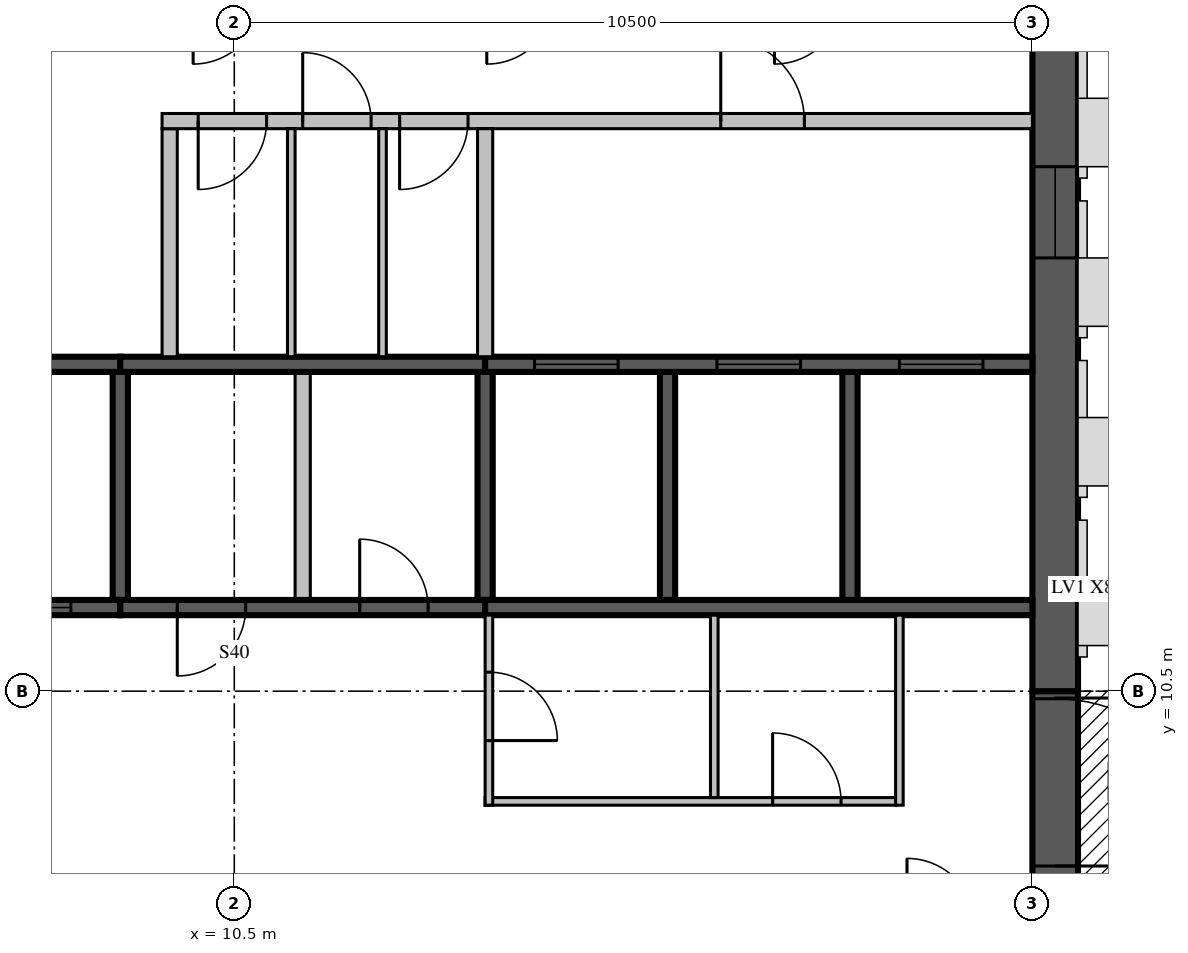
"""IFC4 building model, lengths in metres.
Left out: names, types, materials, properties, quantities, classifications, styles, units other than length and angle.
Written with IfcOpenShell. Run it as: python <this file> out.ifc"""

import sys

from ifc_helpers import new_model, si_unit, direction, frame, frame_2d, origin, place, context, subcontext, project, spatial, rectangle, extrude, source, transform, mapped, element, fill, save


model = new_model("IFC4")
c1 = context("Model", 3, precision=1e-05, world=origin(), true_north=direction((0.0, 1.0)))
c2 = subcontext(c1, "Body", "Model", "MODEL_VIEW")
j1 = project(units=[si_unit("LENGTHUNIT", "METRE"), si_unit("PLANEANGLEUNIT", "RADIAN")], contexts=[c1])
p1 = place(None, origin())
s1 = spatial("IfcSite", under=j1, at=p1, CompositionType="ELEMENT")
p2 = place(p1, origin())
s2 = spatial("IfcBuilding", under=s1, at=p2, CompositionType="ELEMENT")
p3 = place(p2, frame((0.0, 0.0, 291.5)))
s3 = spatial("IfcBuildingStorey", under=s2, at=p3, CompositionType="ELEMENT", Elevation=291.5)
m1 = source(origin(), c2, "Body", "SweptSolid", [
    extrude(rectangle(XDim=6.3, YDim=0.6, at=frame_2d((3.15, 0.0))), origin(), (0.0, 0.0, 1.0), 3.5),
])
p4 = place(p3, frame((21.3, 4.2, 0.0), z_axis=(0.0, 0.0, 1.0), x_axis=(0.0, 1.0, 0.0)))
e1 = element("IfcWall", 1, at=p4, inside=s3, PredefinedType="SHEAR", context=c2, shape_type="MappedRepresentation", body=[
    mapped(m1, transform((0.0, 0.0, 0.0), scale=1.0)),
])
m2 = source(origin(), c2, "Body", "SweptSolid", [
    extrude(rectangle(XDim=2.2, YDim=2.1, at=frame_2d((1.1, 1.05))), frame((0.0, 0.31, 0.0), z_axis=(0.0, -1.0, 0.0), x_axis=(1.0, 0.0, 0.0)), (0.0, 0.0, 1.0), 0.62),
])
p5 = place(p4, frame((4.0, 0.0, 0.0)))
e2 = element("IfcOpeningElement", 2, at=p5, cuts=e1, PredefinedType="OPENING", context=c2, shape_type="MappedRepresentation", body=[
    mapped(m2, transform((0.0, 0.0, 0.0), scale=1.0)),
])
m3 = source(origin(), c2, "Body", "SweptSolid", [
    extrude(rectangle(XDim=10.5, YDim=0.6, at=frame_2d((5.25, 0.0))), origin(), (0.0, 0.0, 1.0), 3.5),
])
p6 = place(p3, frame((21.3, 10.5, 0.0), z_axis=(0.0, 0.0, 1.0), x_axis=(0.0, 1.0, 0.0)))
e3 = element("IfcWall", 3, at=p6, inside=s3, PredefinedType="SHEAR", context=c2, shape_type="MappedRepresentation", body=[
    mapped(m3, transform((0.0, 0.0, 0.0), scale=1.0)),
])
m4 = source(origin(), c2, "Body", "SweptSolid", [
    extrude(rectangle(XDim=1.2, YDim=2.4, at=frame_2d((0.6, 1.2))), frame((0.0, 0.31, 0.0), z_axis=(0.0, -1.0, 0.0), x_axis=(1.0, 0.0, 0.0)), (0.0, 0.0, 1.0), 0.62),
])
p7 = place(p6, frame((5.7, 0.0, 0.6)))
e4 = element("IfcOpeningElement", 4, at=p7, cuts=e3, PredefinedType="OPENING", context=c2, shape_type="MappedRepresentation", body=[
    mapped(m4, transform((0.0, 0.0, 0.0), scale=1.0)),
])
m5 = source(origin(), c2, "Body", "SweptSolid", [
    extrude(rectangle(XDim=3.0, YDim=0.2, at=frame_2d((1.5, 0.0))), origin(), (0.0, 0.0, 1.0), 3.1),
])
for number, where, z_axis, x_axis in (
    (5, (9.0, 11.7, 0.0), (0.0, 0.0, 1.0), (0.0, 1.0, 0.0)),
    (6, (13.8, 11.7, 0.0), (0.0, 0.0, 1.0), (0.0, 1.0, 0.0)),
):
    element("IfcWall", number, at=place(p3, frame(where, z_axis=z_axis, x_axis=x_axis)), inside=s3, PredefinedType="SOLIDWALL", context=c2, shape_type="MappedRepresentation", body=[
        mapped(m5, transform((0.0, 0.0, 0.0), scale=1.0)),
    ])
m6 = source(origin(), c2, "Body", "SweptSolid", [
    extrude(rectangle(XDim=3.0, YDim=0.2, at=frame_2d((1.5, 0.0))), origin(), (0.0, 0.0, 1.0), 3.5),
])
for number, where, z_axis, x_axis in (
    (7, (16.2, 11.7, 0.0), (0.0, 0.0, 1.0), (0.0, 1.0, 0.0)),
    (8, (18.6, 11.7, 0.0), (0.0, 0.0, 1.0), (0.0, 1.0, 0.0)),
):
    element("IfcWall", number, at=place(p3, frame(where, z_axis=z_axis, x_axis=x_axis)), inside=s3, PredefinedType="SOLIDWALL", context=c2, shape_type="MappedRepresentation", body=[
        mapped(m6, transform((0.0, 0.0, 0.0), scale=1.0)),
    ])
m7 = source(origin(), c2, "Body", "SweptSolid", [
    extrude(rectangle(XDim=3.0, YDim=0.2, at=frame_2d((1.5, 0.0))), origin(), (0.0, 0.0, 1.0), 3.1),
])
p8 = place(p3, frame((11.4, 11.7, 0.0), z_axis=(0.0, 0.0, 1.0), x_axis=(0.0, 1.0, 0.0)))
e9 = element("IfcWall", 9, at=p8, inside=s3, PredefinedType="PARTITIONING", context=c2, shape_type="MappedRepresentation", body=[
    mapped(m7, transform((0.0, 0.0, 0.0), scale=1.0)),
])
m8 = source(origin(), c2, "Body", "SweptSolid", [
    extrude(rectangle(XDim=4.8, YDim=0.2, at=frame_2d((2.4, 0.0))), origin(), (0.0, 0.0, 1.0), 3.5),
])
p9 = place(p3, frame((4.2, 11.6, 0.0), z_axis=(0.0, 0.0, 1.0), x_axis=(1.0, 0.0, 0.0)))
e10 = element("IfcWall", 10, at=p9, inside=s3, PredefinedType="SOLIDWALL", context=c2, shape_type="MappedRepresentation", body=[
    mapped(m8, transform((0.0, 0.0, 0.0), scale=1.0)),
])
m9 = source(origin(), c2, "Body", "SweptSolid", [
    extrude(rectangle(XDim=1.1, YDim=2.1, at=frame_2d((0.55, 1.05))), frame((0.0, 0.11, 0.0), z_axis=(0.0, -1.0, 0.0), x_axis=(1.0, 0.0, 0.0)), (0.0, 0.0, 1.0), 0.22),
])
p10 = place(p9, frame((0.65, 0.0, 0.0)))
e11 = element("IfcOpeningElement", 11, at=p10, cuts=e10, PredefinedType="OPENING", context=c2, shape_type="MappedRepresentation", body=[
    mapped(m9, transform((0.0, 0.0, 0.0), scale=1.0)),
])
p11 = place(p9, frame((3.05, 0.0, 0.0)))
e12 = element("IfcOpeningElement", 12, at=p11, cuts=e10, PredefinedType="OPENING", context=c2, shape_type="MappedRepresentation", body=[
    mapped(m9, transform((0.0, 0.0, 0.0), scale=1.0)),
])
m10 = source(origin(), c2, "Body", "SweptSolid", [
    extrude(rectangle(XDim=4.8, YDim=0.2, at=frame_2d((2.4, 0.0))), origin(), (0.0, 0.0, 1.0), 3.1),
])
p12 = place(p3, frame((9.0, 11.6, 0.0), z_axis=(0.0, 0.0, 1.0), x_axis=(1.0, 0.0, 0.0)))
e13 = element("IfcWall", 13, at=p12, inside=s3, PredefinedType="SOLIDWALL", context=c2, shape_type="MappedRepresentation", body=[
    mapped(m10, transform((0.0, 0.0, 0.0), scale=1.0)),
])
m11 = source(origin(), c2, "Body", "SweptSolid", [
    extrude(rectangle(XDim=0.9, YDim=2.1, at=frame_2d((0.45, 1.05))), frame((0.0, 0.11, 0.0), z_axis=(0.0, -1.0, 0.0), x_axis=(1.0, 0.0, 0.0)), (0.0, 0.0, 1.0), 0.22),
])
p13 = place(p12, frame((0.75, 0.0, 0.0)))
e14 = element("IfcOpeningElement", 14, at=p13, cuts=e13, PredefinedType="OPENING", context=c2, shape_type="MappedRepresentation", body=[
    mapped(m11, transform((0.0, 0.0, 0.0), scale=1.0)),
])
p14 = place(p12, frame((3.15, 0.0, 0.0)))
e15 = element("IfcOpeningElement", 15, at=p14, cuts=e13, PredefinedType="OPENING", context=c2, shape_type="MappedRepresentation", body=[
    mapped(m11, transform((0.0, 0.0, 0.0), scale=1.0)),
])
m12 = source(origin(), c2, "Body", "SweptSolid", [
    extrude(rectangle(XDim=7.2, YDim=0.2, at=frame_2d((3.6, 0.0))), origin(), (0.0, 0.0, 1.0), 3.5),
])
p15 = place(p3, frame((13.8, 11.6, 0.0), z_axis=(0.0, 0.0, 1.0), x_axis=(1.0, 0.0, 0.0)))
e16 = element("IfcWall", 16, at=p15, inside=s3, PredefinedType="SOLIDWALL", context=c2, shape_type="MappedRepresentation", body=[
    mapped(m12, transform((0.0, 0.0, 0.0), scale=1.0)),
])
p16 = place(p3, frame((4.2, 14.8, 0.0), z_axis=(0.0, 0.0, 1.0), x_axis=(1.0, 0.0, 0.0)))
e17 = element("IfcWall", 17, at=p16, inside=s3, PredefinedType="SOLIDWALL", context=c2, shape_type="MappedRepresentation", body=[
    mapped(m8, transform((0.0, 0.0, 0.0), scale=1.0)),
])
p17 = place(p3, frame((9.0, 14.8, 0.0), z_axis=(0.0, 0.0, 1.0), x_axis=(1.0, 0.0, 0.0)))
e18 = element("IfcWall", 18, at=p17, inside=s3, PredefinedType="SOLIDWALL", context=c2, shape_type="MappedRepresentation", body=[
    mapped(m10, transform((0.0, 0.0, 0.0), scale=1.0)),
])
p18 = place(p3, frame((13.8, 14.8, 0.0), z_axis=(0.0, 0.0, 1.0), x_axis=(1.0, 0.0, 0.0)))
e19 = element("IfcWall", 19, at=p18, inside=s3, PredefinedType="SOLIDWALL", context=c2, shape_type="MappedRepresentation", body=[
    mapped(m12, transform((0.0, 0.0, 0.0), scale=1.0)),
])
p19 = place(p18, frame((0.65, 0.0, 0.0)))
e20 = element("IfcOpeningElement", 20, at=p19, cuts=e19, PredefinedType="OPENING", context=c2, shape_type="MappedRepresentation", body=[
    mapped(m9, transform((0.0, 0.0, 0.0), scale=1.0)),
])
p20 = place(p18, frame((3.05, 0.0, 0.0)))
e21 = element("IfcOpeningElement", 21, at=p20, cuts=e19, PredefinedType="OPENING", context=c2, shape_type="MappedRepresentation", body=[
    mapped(m9, transform((0.0, 0.0, 0.0), scale=1.0)),
])
p21 = place(p18, frame((5.45, 0.0, 0.0)))
e22 = element("IfcOpeningElement", 22, at=p21, cuts=e19, PredefinedType="OPENING", context=c2, shape_type="MappedRepresentation", body=[
    mapped(m9, transform((0.0, 0.0, 0.0), scale=1.0)),
])
p22 = place(p3, frame((9.65, 14.9, 0.0), z_axis=(0.0, 0.0, 1.0), x_axis=(0.0, 1.0, 0.0)))
e23 = element("IfcWall", 23, at=p22, inside=s3, PredefinedType="PARTITIONING", context=c2, shape_type="MappedRepresentation", body=[
    mapped(m7, transform((0.0, 0.0, 0.0), scale=1.0)),
])
m13 = source(origin(), c2, "Body", "SweptSolid", [
    extrude(rectangle(XDim=11.45, YDim=0.2, at=frame_2d((5.725, 0.0))), origin(), (0.0, 0.0, 1.0), 3.1),
])
p23 = place(p3, frame((9.55, 18.0, 0.0), z_axis=(0.0, 0.0, 1.0), x_axis=(1.0, 0.0, 0.0)))
e24 = element("IfcWall", 24, at=p23, inside=s3, PredefinedType="PARTITIONING", context=c2, shape_type="MappedRepresentation", body=[
    mapped(m13, transform((0.0, 0.0, 0.0), scale=1.0)),
])
p24 = place(p23, frame((0.475, 0.0, 0.0)))
e25 = element("IfcOpeningElement", 25, at=p24, cuts=e24, PredefinedType="OPENING", context=c2, shape_type="MappedRepresentation", body=[
    mapped(m11, transform((0.0, 0.0, 0.0), scale=1.0)),
])
p25 = place(p23, frame((1.85, 0.0, 0.0)))
e26 = element("IfcOpeningElement", 26, at=p25, cuts=e24, PredefinedType="OPENING", context=c2, shape_type="MappedRepresentation", body=[
    mapped(m11, transform((0.0, 0.0, 0.0), scale=1.0)),
])
p26 = place(p23, frame((3.125, 0.0, 0.0)))
e27 = element("IfcOpeningElement", 27, at=p26, cuts=e24, PredefinedType="OPENING", context=c2, shape_type="MappedRepresentation", body=[
    mapped(m11, transform((0.0, 0.0, 0.0), scale=1.0)),
])
p27 = place(p23, frame((7.35, 0.0, 0.0)))
e28 = element("IfcOpeningElement", 28, at=p27, cuts=e24, PredefinedType="OPENING", context=c2, shape_type="MappedRepresentation", body=[
    mapped(m9, transform((0.0, 0.0, 0.0), scale=1.0)),
])
p28 = place(p3, frame((13.8, 9.05, 0.0), z_axis=(0.0, 0.0, 1.0), x_axis=(1.0, 0.0, 0.0)))
e29 = element("IfcWall", 29, at=p28, inside=s3, PredefinedType="PARTITIONING", context=c2, shape_type="SweptSolid", body=[
    extrude(rectangle(XDim=5.4, YDim=0.1, at=frame_2d((2.7, 0.0))), origin(), (0.0, 0.0, 1.0), 3.1),
])
m14 = source(origin(), c2, "Body", "SweptSolid", [
    extrude(rectangle(XDim=0.9, YDim=2.1, at=frame_2d((0.45, 1.05))), frame((0.0, 0.06, 0.0), z_axis=(0.0, -1.0, 0.0), x_axis=(1.0, 0.0, 0.0)), (0.0, 0.0, 1.0), 0.12),
])
p29 = place(p28, frame((3.783, 0.0, 0.0)))
e30 = element("IfcOpeningElement", 30, at=p29, cuts=e29, PredefinedType="OPENING", context=c2, shape_type="MappedRepresentation", body=[
    mapped(m14, transform((0.0, 0.0, 0.0), scale=1.0)),
])
p30 = place(p3, frame((13.85, 9.0, 0.0), z_axis=(0.0, 0.0, 1.0), x_axis=(0.0, 1.0, 0.0)))
e31 = element("IfcWall", 31, at=p30, inside=s3, PredefinedType="PARTITIONING", context=c2, shape_type="SweptSolid", body=[
    extrude(rectangle(XDim=2.5, YDim=0.1, at=frame_2d((1.25, 0.0))), origin(), (0.0, 0.0, 1.0), 3.1),
])
p31 = place(p30, frame((0.85, 0.0, 0.0)))
e32 = element("IfcOpeningElement", 32, at=p31, cuts=e31, PredefinedType="OPENING", context=c2, shape_type="MappedRepresentation", body=[
    mapped(m14, transform((0.0, 0.0, 0.0), scale=1.0)),
])
p32 = place(p3, frame((16.815, 9.1, 0.0), z_axis=(0.0, 0.0, 1.0), x_axis=(0.0, 1.0, 0.0)))
e33 = element("IfcWall", 33, at=p32, inside=s3, PredefinedType="PARTITIONING", context=c2, shape_type="SweptSolid", body=[
    extrude(rectangle(XDim=2.4, YDim=0.1, at=frame_2d((1.2, 0.0))), origin(), (0.0, 0.0, 1.0), 3.1),
])
m15 = source(origin(), c2, "Body", "SweptSolid", [
    extrude(rectangle(XDim=2.5, YDim=0.1, at=frame_2d((1.25, 0.0))), origin(), (0.0, 0.0, 1.0), 3.1),
])
p33 = place(p3, frame((19.25, 9.0, 0.0), z_axis=(0.0, 0.0, 1.0), x_axis=(0.0, 1.0, 0.0)))
e34 = element("IfcWall", 34, at=p33, inside=s3, PredefinedType="PARTITIONING", context=c2, shape_type="MappedRepresentation", body=[
    mapped(m15, transform((0.0, 0.0, 0.0), scale=1.0)),
])
p34 = place(p3, frame((13.8, 14.9, 0.0), z_axis=(0.0, 0.0, 1.0), x_axis=(0.0, 1.0, 0.0)))
e35 = element("IfcWall", 35, at=p34, inside=s3, PredefinedType="PARTITIONING", context=c2, shape_type="MappedRepresentation", body=[
    mapped(m7, transform((0.0, 0.0, 0.0), scale=1.0)),
])
m16 = source(origin(), c2, "Body", "SweptSolid", [
    extrude(rectangle(XDim=3.0, YDim=0.1, at=frame_2d((1.5, 0.0))), origin(), (0.0, 0.0, 1.0), 3.1),
])
for number, where, z_axis, x_axis in (
    (36, (11.25, 14.9, 0.0), (0.0, 0.0, 1.0), (0.0, 1.0, 0.0)),
    (37, (12.45, 14.9, 0.0), (0.0, 0.0, 1.0), (0.0, 1.0, 0.0)),
):
    element("IfcWall", number, at=place(p3, frame(where, z_axis=z_axis, x_axis=x_axis)), inside=s3, PredefinedType="PARTITIONING", context=c2, shape_type="MappedRepresentation", body=[
        mapped(m16, transform((0.0, 0.0, 0.0), scale=1.0)),
    ])
m17 = source(origin(), c2, "Body", "SweptSolid", [
    extrude(rectangle(XDim=1.1, YDim=2.1, at=frame_2d((0.55, 1.05))), frame((0.0, 0.025, 0.0), z_axis=(0.0, -1.0, 0.0), x_axis=(1.0, 0.0, 0.0)), (0.0, 0.0, 1.0), 0.05),
])
p35 = place(p11, origin())
e38 = element("IfcDoor", 38, at=p35, inside=s3, OperationType="SLIDING_TO_LEFT", PredefinedType="DOOR", context=c2, shape_type="MappedRepresentation", body=[
    mapped(m17, transform((0.0, 0.0, 0.0), scale=1.0)),
])
fill(e12, e38)
m18 = source(origin(), c2, "Body", "SweptSolid", [
    extrude(rectangle(XDim=0.9, YDim=2.1, at=frame_2d((0.45, 1.05))), frame((0.0, 0.025, 0.0), z_axis=(0.0, -1.0, 0.0), x_axis=(1.0, 0.0, 0.0)), (0.0, 0.0, 1.0), 0.05),
])
p36 = place(p13, origin())
e39 = element("IfcDoor", 39, at=p36, inside=s3, OperationType="SINGLE_SWING_RIGHT", PredefinedType="DOOR", context=c2, shape_type="MappedRepresentation", body=[
    mapped(m18, transform((0.0, 0.0, 0.0), scale=1.0)),
])
fill(e14, e39)
p37 = place(p14, origin())
e40 = element("IfcDoor", 40, at=p37, inside=s3, OperationType="SINGLE_SWING_LEFT", PredefinedType="DOOR", context=c2, shape_type="MappedRepresentation", body=[
    mapped(m18, transform((0.0, 0.0, 0.0), scale=1.0)),
])
fill(e15, e40)
p38 = place(p19, origin())
e41 = element("IfcDoor", 41, at=p38, inside=s3, OperationType="SLIDING_TO_LEFT", PredefinedType="DOOR", context=c2, shape_type="MappedRepresentation", body=[
    mapped(m17, transform((0.0, 0.0, 0.0), scale=1.0)),
])
fill(e20, e41)
p39 = place(p20, origin())
e42 = element("IfcDoor", 42, at=p39, inside=s3, OperationType="SLIDING_TO_LEFT", PredefinedType="DOOR", context=c2, shape_type="MappedRepresentation", body=[
    mapped(m17, transform((0.0, 0.0, 0.0), scale=1.0)),
])
fill(e21, e42)
p40 = place(p21, origin())
e43 = element("IfcDoor", 43, at=p40, inside=s3, OperationType="SLIDING_TO_LEFT", PredefinedType="DOOR", context=c2, shape_type="MappedRepresentation", body=[
    mapped(m17, transform((0.0, 0.0, 0.0), scale=1.0)),
])
fill(e22, e43)
p41 = place(p24, origin())
e44 = element("IfcDoor", 44, at=p41, inside=s3, OperationType="SINGLE_SWING_RIGHT", PredefinedType="DOOR", context=c2, shape_type="MappedRepresentation", body=[
    mapped(m18, transform((0.0, 0.0, 0.0), scale=1.0)),
])
fill(e25, e44)
p42 = place(p25, origin())
e45 = element("IfcDoor", 45, at=p42, inside=s3, OperationType="SINGLE_SWING_LEFT", PredefinedType="DOOR", context=c2, shape_type="MappedRepresentation", body=[
    mapped(m18, transform((0.0, 0.0, 0.0), scale=1.0)),
])
fill(e26, e45)
p43 = place(p26, origin())
e46 = element("IfcDoor", 46, at=p43, inside=s3, OperationType="SINGLE_SWING_RIGHT", PredefinedType="DOOR", context=c2, shape_type="MappedRepresentation", body=[
    mapped(m18, transform((0.0, 0.0, 0.0), scale=1.0)),
])
fill(e27, e46)
p44 = place(p27, origin())
e47 = element("IfcDoor", 47, at=p44, inside=s3, OperationType="SINGLE_SWING_LEFT", PredefinedType="DOOR", context=c2, shape_type="MappedRepresentation", body=[
    mapped(m17, transform((0.0, 0.0, 0.0), scale=1.0)),
])
fill(e28, e47)
p45 = place(p29, origin())
e48 = element("IfcDoor", 48, at=p45, inside=s3, OperationType="SINGLE_SWING_LEFT", PredefinedType="DOOR", context=c2, shape_type="MappedRepresentation", body=[
    mapped(m18, transform((0.0, 0.0, 0.0), scale=1.0)),
])
fill(e30, e48)
p46 = place(p31, origin())
e49 = element("IfcDoor", 49, at=p46, inside=s3, OperationType="SINGLE_SWING_RIGHT", PredefinedType="DOOR", context=c2, shape_type="MappedRepresentation", body=[
    mapped(m18, transform((0.0, 0.0, 0.0), scale=1.0)),
])
fill(e32, e49)
m19 = source(origin(), c2, "Body", "SweptSolid", [
    extrude(rectangle(XDim=2.2, YDim=2.1, at=frame_2d((1.1, 1.05))), frame((0.0, 0.025, 0.0), z_axis=(0.0, -1.0, 0.0), x_axis=(1.0, 0.0, 0.0)), (0.0, 0.0, 1.0), 0.05),
])
p47 = place(p5, origin())
e50 = element("IfcDoor", 50, at=p47, inside=s3, OperationType="DOUBLE_DOOR_SINGLE_SWING", PredefinedType="DOOR", context=c2, shape_type="MappedRepresentation", body=[
    mapped(m19, transform((0.0, 0.0, 0.0), scale=1.0)),
])
fill(e2, e50)
m20 = source(origin(), c2, "Body", "SweptSolid", [
    extrude(rectangle(XDim=1.2, YDim=2.4, at=frame_2d((0.6, 1.2))), frame((0.0, 0.03, 0.0), z_axis=(0.0, -1.0, 0.0), x_axis=(1.0, 0.0, 0.0)), (0.0, 0.0, 1.0), 0.06),
])
p48 = place(p7, origin())
e51 = element("IfcWindow", 51, at=p48, inside=s3, PartitioningType="SINGLE_PANEL", PredefinedType="WINDOW", context=c2, shape_type="MappedRepresentation", body=[
    mapped(m20, transform((0.0, 0.0, 0.0), scale=1.0)),
])
fill(e4, e51)
save(model, sys.argv[1])
